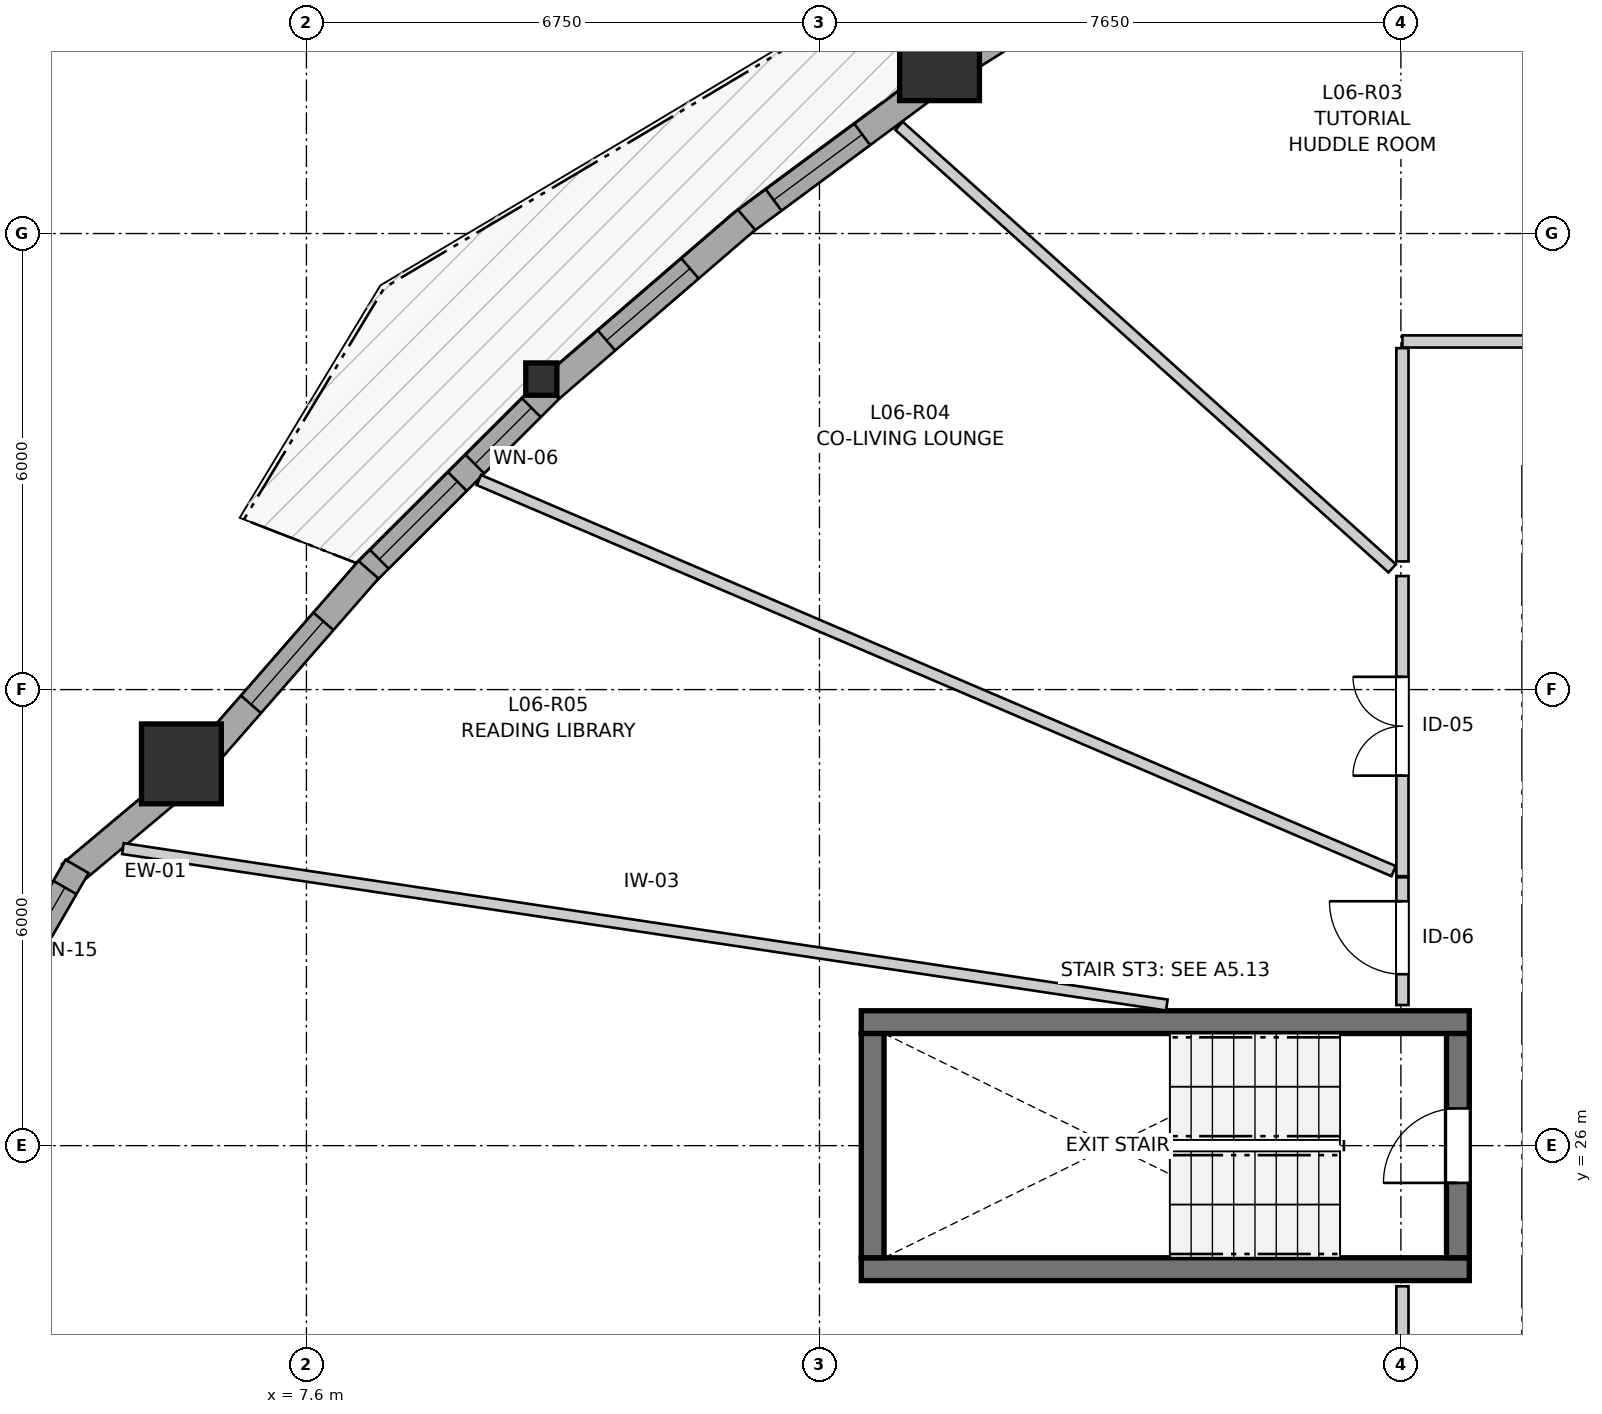
"""IFC4 building model, lengths in metres.
Left out: names, types, materials, properties, quantities, classifications, styles, units other than length and angle.
Written with IfcOpenShell. Run it as: python <this file> out.ifc"""

import sys

from ifc_helpers import new_model, si_unit, direction, frame, frame_2d, origin, origin_2d, place, context, subcontext, project, spatial, rectangle, i_section, extrude, source, transform, mapped, element, fill, save


model = new_model("IFC4")
c1 = context("Model", 3, precision=1e-05, world=origin(), true_north=direction((0.0, 1.0)))
c2 = subcontext(c1, "Body", "Model", "MODEL_VIEW")
j1 = project(units=[si_unit("LENGTHUNIT", "METRE"), si_unit("PLANEANGLEUNIT", "RADIAN")], contexts=[c1])
p1 = place(None, origin())
s1 = spatial("IfcSite", under=j1, at=p1, CompositionType="ELEMENT")
p2 = place(p1, origin())
s2 = spatial("IfcBuilding", under=s1, at=p2, CompositionType="ELEMENT")
p3 = place(p2, frame((0.0, 0.0, 23.8)))
s3 = spatial("IfcBuildingStorey", under=s2, at=p3, CompositionType="ELEMENT", Elevation=23.8)
for number, where, z_axis, x_axis in (
    (1, (14.9, 24.375, 0.0), (0.0, 0.0, 1.0), (1.0, 0.0, 0.0)),
    (2, (22.9, 27.625, 0.0), (0.0, 0.0, 1.0), (-1.0, 0.0, 0.0)),
):
    element("IfcWall", number, at=place(p3, frame(where, z_axis=z_axis, x_axis=x_axis)), inside=s3, PredefinedType="SHEAR", context=c2, shape_type="SweptSolid", body=[
        extrude(rectangle(XDim=8.0, YDim=0.3, at=frame_2d((4.0, 0.0))), origin(), (0.0, 0.0, 1.0), 2.935),
    ])
p4 = place(p3, frame((15.05, 27.475, 0.0), z_axis=(0.0, 0.0, 1.0), x_axis=(0.0, -1.0, 0.0)))
e3 = element("IfcWall", 3, at=p4, inside=s3, PredefinedType="SHEAR", context=c2, shape_type="SweptSolid", body=[
    extrude(rectangle(XDim=2.95, YDim=0.3, at=frame_2d((1.475, 0.0))), origin(), (0.0, 0.0, 1.0), 2.935),
])
p5 = place(p3, frame((22.75, 24.525, 0.0), z_axis=(0.0, 0.0, 1.0), x_axis=(0.0, 1.0, 0.0)))
e4 = element("IfcWall", 4, at=p5, inside=s3, PredefinedType="SHEAR", context=c2, shape_type="SweptSolid", body=[
    extrude(rectangle(XDim=2.95, YDim=0.3, at=frame_2d((1.475, 0.0))), origin(), (0.0, 0.0, 1.0), 2.935),
])
p6 = place(p5, frame((0.985, 0.0, 0.0)))
e5 = element("IfcOpeningElement", 5, at=p6, cuts=e4, PredefinedType="OPENING", context=c2, shape_type="SweptSolid", body=[
    extrude(rectangle(XDim=0.98, YDim=2.15, at=frame_2d((0.49, 1.075))), frame((0.0, 0.16, 0.0), z_axis=(0.0, -1.0, 0.0), x_axis=(1.0, 0.0, 0.0)), (0.0, 0.0, 1.0), 0.32),
])
m1 = source(origin(), c2, "Body", "SweptSolid", [
    extrude(rectangle(XDim=1.05, YDim=1.05, at=origin_2d()), origin(), (0.0, 0.0, 1.0), 2.935),
])
for number, where, z_axis, x_axis in (
    (6, (5.955, 31.023, 0.0), (0.0, 0.0, 1.0), (1.0, 0.0, 0.0)),
    (7, (15.93, 40.274, 0.0), (0.0, 0.0, 1.0), (1.0, 0.0, 0.0)),
):
    element("IfcColumn", number, at=place(p3, frame(where, z_axis=z_axis, x_axis=x_axis)), inside=s3, PredefinedType="COLUMN", context=c2, shape_type="MappedRepresentation", body=[
        mapped(m1, transform((0.0, 0.0, 0.0), x_axis=(1.0, 0.0, 0.0), y_axis=(0.0, 1.0, 0.0), z_axis=(0.0, 0.0, 1.0), scale=1.0)),
    ])
m2 = source(origin(), c2, "Body", "SweptSolid", [
    extrude(i_section(OverallWidth=0.409, OverallDepth=0.425, WebThickness=0.03, FlangeThickness=0.048, FilletRadius=0.015, at=origin_2d()), origin(), (0.0, 0.0, 1.0), 2.935),
])
p7 = place(p3, frame((10.69, 36.085, 0.0), z_axis=(0.0, 0.0, 1.0), x_axis=(1.0, 0.0, 0.0)))
e8 = element("IfcColumn", 8, at=p7, inside=s3, PredefinedType="PILASTER", context=c2, shape_type="MappedRepresentation", body=[
    mapped(m2, transform((0.0, 0.0, 0.0), x_axis=(1.0, 0.0, 0.0), y_axis=(0.0, 1.0, 0.0), z_axis=(0.0, 0.0, 1.0), scale=1.0)),
])
p8 = place(p3, frame((5.838, 30.696, 0.0), z_axis=(0.0, 0.0, 1.0), x_axis=(-0.766001205563, -0.64283913468, 0.0)))
e9 = element("IfcWall", 9, at=p8, inside=s3, PredefinedType="SOLIDWALL", context=c2, shape_type="SweptSolid", body=[
    extrude(rectangle(XDim=1.752, YDim=0.35, at=frame_2d((0.876, 0.0))), origin(), (0.0, 0.0, 1.0), 2.415),
])
p9 = place(p3, frame((4.583, 29.674, 0.0), z_axis=(0.0, 0.0, 1.0), x_axis=(-0.499995423472, -0.866028046028, 0.0)))
e10 = element("IfcWall", 10, at=p9, inside=s3, PredefinedType="SOLIDWALL", context=c2, shape_type="SweptSolid", body=[
    extrude(rectangle(XDim=2.09, YDim=0.35, at=frame_2d((1.045, 0.0))), origin(), (0.0, 0.0, 1.0), 2.415),
])
p10 = place(p9, frame((0.32, 0.0, 0.82)))
e11 = element("IfcOpeningElement", 11, at=p10, cuts=e10, PredefinedType="OPENING", context=c2, shape_type="SweptSolid", body=[
    extrude(rectangle(XDim=1.45, YDim=1.25, at=frame_2d((0.725, 0.625))), frame((0.0, 0.185, 0.0), z_axis=(0.0, -1.0, 0.0), x_axis=(1.0, 0.0, 0.0)), (0.0, 0.0, 1.0), 0.37),
])
p11 = place(p3, frame((3.537, 24.137, 0.0), z_axis=(0.0, 0.0, 1.0), x_axis=(0.499995423472, -0.866028046028, 0.0)))
e12 = element("IfcWall", 12, at=p11, inside=s3, PredefinedType="SOLIDWALL", context=c2, shape_type="SweptSolid", body=[
    extrude(rectangle(XDim=2.09, YDim=0.35, at=frame_2d((1.045, 0.0))), origin(), (0.0, 0.0, 1.0), 2.415),
])
p12 = place(p11, frame((0.32, 0.0, 0.82)))
e13 = element("IfcOpeningElement", 13, at=p12, cuts=e12, PredefinedType="OPENING", context=c2, shape_type="SweptSolid", body=[
    extrude(rectangle(XDim=1.45, YDim=1.25, at=frame_2d((0.725, 0.625))), frame((0.0, 0.185, 0.0), z_axis=(0.0, -1.0, 0.0), x_axis=(1.0, 0.0, 0.0)), (0.0, 0.0, 1.0), 0.37),
])
p13 = place(p3, frame((18.864, 41.913, 0.0), z_axis=(0.0, 0.0, 1.0), x_axis=(-0.84643287852, -0.532495429239, 0.0)))
e14 = element("IfcWall", 14, at=p13, inside=s3, PredefinedType="SOLIDWALL", context=c2, shape_type="SweptSolid", body=[
    extrude(rectangle(XDim=3.056, YDim=0.35, at=frame_2d((1.528, 0.0))), origin(), (0.0, 0.0, 1.0), 2.415),
])
p14 = place(p13, frame((0.808, 0.0, 0.82)))
e15 = element("IfcOpeningElement", 15, at=p14, cuts=e14, PredefinedType="OPENING", context=c2, shape_type="SweptSolid", body=[
    extrude(rectangle(XDim=1.45, YDim=1.25, at=frame_2d((0.725, 0.625))), frame((0.0, 0.185, 0.0), z_axis=(0.0, -1.0, 0.0), x_axis=(1.0, 0.0, 0.0)), (0.0, 0.0, 1.0), 0.37),
])
p15 = place(p3, frame((15.793, 39.955, 0.0), z_axis=(0.0, 0.0, 1.0), x_axis=(-0.803813051054, -0.594881987419, 0.0)))
e16 = element("IfcWall", 16, at=p15, inside=s3, PredefinedType="SOLIDWALL", context=c2, shape_type="SweptSolid", body=[
    extrude(rectangle(XDim=3.075, YDim=0.35, at=frame_2d((1.538, 0.0))), origin(), (0.0, 0.0, 1.0), 2.415),
])
p16 = place(p15, frame((1.095, 0.0, 0.82)))
e17 = element("IfcOpeningElement", 17, at=p16, cuts=e16, PredefinedType="OPENING", context=c2, shape_type="SweptSolid", body=[
    extrude(rectangle(XDim=1.45, YDim=1.25, at=frame_2d((0.725, 0.625))), frame((0.0, 0.185, 0.0), z_axis=(0.0, -1.0, 0.0), x_axis=(1.0, 0.0, 0.0)), (0.0, 0.0, 1.0), 0.37),
])
p17 = place(p3, frame((13.39, 38.181, 0.0), z_axis=(0.0, 0.0, 1.0), x_axis=(-0.757476213352, -0.652862762153, 0.0)))
e18 = element("IfcWall", 18, at=p17, inside=s3, PredefinedType="SOLIDWALL", context=c2, shape_type="SweptSolid", body=[
    extrude(rectangle(XDim=3.393, YDim=0.35, at=frame_2d((1.697, 0.0))), origin(), (0.0, 0.0, 1.0), 2.415),
])
p18 = place(p17, frame((0.982, 0.0, 0.82)))
e19 = element("IfcOpeningElement", 19, at=p18, cuts=e18, PredefinedType="OPENING", context=c2, shape_type="SweptSolid", body=[
    extrude(rectangle(XDim=1.45, YDim=1.25, at=frame_2d((0.725, 0.625))), frame((0.0, 0.185, 0.0), z_axis=(0.0, -1.0, 0.0), x_axis=(1.0, 0.0, 0.0)), (0.0, 0.0, 1.0), 0.37),
])
p19 = place(p3, frame((10.8, 35.947, 0.0), z_axis=(0.0, 0.0, 1.0), x_axis=(-0.708379570295, -0.705831696928, 0.0)))
e20 = element("IfcWall", 20, at=p19, inside=s3, PredefinedType="SOLIDWALL", context=c2, shape_type="SweptSolid", body=[
    extrude(rectangle(XDim=3.449, YDim=0.35, at=frame_2d((1.725, 0.0))), origin(), (0.0, 0.0, 1.0), 2.415),
])
p20 = place(p19, frame((0.339, 0.0, 0.82)))
e21 = element("IfcOpeningElement", 21, at=p20, cuts=e20, PredefinedType="OPENING", context=c2, shape_type="SweptSolid", body=[
    extrude(rectangle(XDim=1.05, YDim=1.45, at=frame_2d((0.525, 0.725))), frame((0.0, 0.185, 0.0), z_axis=(0.0, -1.0, 0.0), x_axis=(1.0, 0.0, 0.0)), (0.0, 0.0, 1.0), 0.37),
])
p21 = place(p19, frame((1.713, 0.0, 0.82)))
e22 = element("IfcOpeningElement", 22, at=p21, cuts=e20, PredefinedType="OPENING", context=c2, shape_type="SweptSolid", body=[
    extrude(rectangle(XDim=1.45, YDim=1.25, at=frame_2d((0.725, 0.625))), frame((0.0, 0.185, 0.0), z_axis=(0.0, -1.0, 0.0), x_axis=(1.0, 0.0, 0.0)), (0.0, 0.0, 1.0), 0.37),
])
p22 = place(p3, frame((8.417, 33.577, 0.0), z_axis=(0.0, 0.0, 1.0), x_axis=(-0.657597964565, -0.75336904436, 0.0)))
e23 = element("IfcWall", 23, at=p22, inside=s3, PredefinedType="SOLIDWALL", context=c2, shape_type="SweptSolid", body=[
    extrude(rectangle(XDim=3.243, YDim=0.35, at=frame_2d((1.621, 0.0))), origin(), (0.0, 0.0, 1.0), 2.415),
])
p23 = place(p22, frame((0.901, 0.0, 0.82)))
e24 = element("IfcOpeningElement", 24, at=p23, cuts=e23, PredefinedType="OPENING", context=c2, shape_type="SweptSolid", body=[
    extrude(rectangle(XDim=1.45, YDim=1.25, at=frame_2d((0.725, 0.625))), frame((0.0, 0.185, 0.0), z_axis=(0.0, -1.0, 0.0), x_axis=(1.0, 0.0, 0.0)), (0.0, 0.0, 1.0), 0.37),
])
p24 = place(p3, frame((22.02, 16.616, 0.0), z_axis=(0.0, 0.0, 1.0), x_axis=(0.0, 1.0, 0.0)))
e25 = element("IfcWall", 25, at=p24, inside=s3, PredefinedType="PARTITIONING", context=c2, shape_type="SweptSolid", body=[
    extrude(rectangle(XDim=7.534, YDim=0.16, at=frame_2d((3.767, 0.0))), origin(), (0.0, 0.0, 1.0), 2.935),
])
p25 = place(p24, frame((2.98, 0.0, 0.0)))
e26 = element("IfcOpeningElement", 26, at=p25, cuts=e25, PredefinedType="OPENING", context=c2, shape_type="SweptSolid", body=[
    extrude(rectangle(XDim=1.3, YDim=2.1, at=frame_2d((0.65, 1.05))), frame((0.0, 0.09, 0.0), z_axis=(0.0, -1.0, 0.0), x_axis=(1.0, 0.0, 0.0)), (0.0, 0.0, 1.0), 0.18),
])
p26 = place(p3, frame((22.02, 36.58, 0.0), z_axis=(0.0, 0.0, 1.0), x_axis=(1.0, 0.0, 0.0)))
e27 = element("IfcWall", 27, at=p26, inside=s3, PredefinedType="PARTITIONING", context=c2, shape_type="SweptSolid", body=[
    extrude(rectangle(XDim=4.874, YDim=0.16, at=frame_2d((2.437, 0.0))), origin(), (0.0, 0.0, 1.0), 2.543),
])
p27 = place(p26, frame((1.779, 0.0, 0.0)))
e28 = element("IfcOpeningElement", 28, at=p27, cuts=e27, PredefinedType="OPENING", context=c2, shape_type="SweptSolid", body=[
    extrude(rectangle(XDim=1.3, YDim=2.1, at=frame_2d((0.65, 1.05))), frame((0.0, 0.09, 0.0), z_axis=(0.0, -1.0, 0.0), x_axis=(1.0, 0.0, 0.0)), (0.0, 0.0, 1.0), 0.18),
])
p28 = place(p3, frame((22.02, 29.545, 0.0), z_axis=(0.0, 0.0, 1.0), x_axis=(0.0, 1.0, 0.0)))
e29 = element("IfcWall", 29, at=p28, inside=s3, PredefinedType="PARTITIONING", context=c2, shape_type="SweptSolid", body=[
    extrude(rectangle(XDim=3.949, YDim=0.16, at=frame_2d((1.975, 0.0))), origin(), (0.0, 0.0, 1.0), 2.935),
])
p29 = place(p28, frame((1.323, 0.0, 0.0)))
e30 = element("IfcOpeningElement", 30, at=p29, cuts=e29, PredefinedType="OPENING", context=c2, shape_type="SweptSolid", body=[
    extrude(rectangle(XDim=1.3, YDim=2.1, at=frame_2d((0.65, 1.05))), frame((0.0, 0.09, 0.0), z_axis=(0.0, -1.0, 0.0), x_axis=(1.0, 0.0, 0.0)), (0.0, 0.0, 1.0), 0.18),
])
p30 = place(p3, frame((22.02, 27.85, 0.0), z_axis=(0.0, 0.0, 1.0), x_axis=(0.0, 1.0, 0.0)))
e31 = element("IfcWall", 31, at=p30, inside=s3, PredefinedType="PARTITIONING", context=c2, shape_type="SweptSolid", body=[
    extrude(rectangle(XDim=1.68, YDim=0.16, at=frame_2d((0.84, 0.0))), origin(), (0.0, 0.0, 1.0), 2.935),
])
p31 = place(p30, frame((0.406, 0.0, 0.0)))
e32 = element("IfcOpeningElement", 32, at=p31, cuts=e31, PredefinedType="OPENING", context=c2, shape_type="SweptSolid", body=[
    extrude(rectangle(XDim=0.96, YDim=2.1, at=frame_2d((0.48, 1.05))), frame((0.0, 0.09, 0.0), z_axis=(0.0, -1.0, 0.0), x_axis=(1.0, 0.0, 0.0)), (0.0, 0.0, 1.0), 0.18),
])
p32 = place(p3, frame((5.185, 29.908, 0.0), z_axis=(0.0, 0.0, 1.0), x_axis=(0.988958777333, -0.148190879394, 0.0)))
e33 = element("IfcWall", 33, at=p32, inside=s3, PredefinedType="PARTITIONING", context=c2, shape_type="SweptSolid", body=[
    extrude(rectangle(XDim=13.888, YDim=0.145, at=frame_2d((6.944, 0.0))), origin(), (0.0, 0.0, 1.0), 2.935),
])
p33 = place(p3, frame((9.869, 34.757, 0.0), z_axis=(0.0, 0.0, 1.0), x_axis=(0.919492001568, -0.393108711493, 0.0)))
e34 = element("IfcWall", 34, at=p33, inside=s3, PredefinedType="PARTITIONING", context=c2, shape_type="SweptSolid", body=[
    extrude(rectangle(XDim=13.089, YDim=0.145, at=frame_2d((6.544, 0.0))), origin(), (0.0, 0.0, 1.0), 2.935),
])
p34 = place(p3, frame((15.398, 39.417, 0.0), z_axis=(0.0, 0.0, 1.0), x_axis=(0.744248709075, -0.667902581998, 0.0)))
e35 = element("IfcWall", 35, at=p34, inside=s3, PredefinedType="PARTITIONING", context=c2, shape_type="SweptSolid", body=[
    extrude(rectangle(XDim=8.717, YDim=0.145, at=frame_2d((4.359, 0.0))), origin(), (0.0, 0.0, 1.0), 2.935),
])
p35 = place(p3, frame((22.02, 33.686, 0.0), z_axis=(0.0, 0.0, 1.0), x_axis=(0.0, 1.0, 0.0)))
e36 = element("IfcWall", 36, at=p35, inside=s3, PredefinedType="PARTITIONING", context=c2, shape_type="SweptSolid", body=[
    extrude(rectangle(XDim=2.806, YDim=0.16, at=frame_2d((1.403, 0.0))), origin(), (0.0, 0.0, 1.0), 2.935),
])
m3 = source(origin(), c2, "Body", "SweptSolid", [
    extrude(rectangle(XDim=1.45, YDim=1.25, at=frame_2d((0.725, 0.625))), frame((0.0, 0.03, 0.0), z_axis=(0.0, -1.0, 0.0), x_axis=(1.0, 0.0, 0.0)), (0.0, 0.0, 1.0), 0.06),
])
p36 = place(p10, origin())
e37 = element("IfcWindow", 37, at=p36, inside=s3, PartitioningType="SINGLE_PANEL", PredefinedType="WINDOW", context=c2, shape_type="MappedRepresentation", body=[
    mapped(m3, transform((0.0, 0.0, 0.0), x_axis=(1.0, 0.0, 0.0), y_axis=(0.0, 1.0, 0.0), z_axis=(0.0, 0.0, 1.0), scale=1.0)),
])
fill(e11, e37)
p37 = place(p12, origin())
e38 = element("IfcWindow", 38, at=p37, inside=s3, PartitioningType="SINGLE_PANEL", PredefinedType="WINDOW", context=c2, shape_type="MappedRepresentation", body=[
    mapped(m3, transform((0.0, 0.0, 0.0), x_axis=(1.0, 0.0, 0.0), y_axis=(0.0, 1.0, 0.0), z_axis=(0.0, 0.0, 1.0), scale=1.0)),
])
fill(e13, e38)
p38 = place(p16, origin())
e39 = element("IfcWindow", 39, at=p38, inside=s3, PartitioningType="SINGLE_PANEL", PredefinedType="WINDOW", context=c2, shape_type="MappedRepresentation", body=[
    mapped(m3, transform((0.0, 0.0, 0.0), x_axis=(1.0, 0.0, 0.0), y_axis=(0.0, 1.0, 0.0), z_axis=(0.0, 0.0, 1.0), scale=1.0)),
])
fill(e17, e39)
p39 = place(p18, origin())
e40 = element("IfcWindow", 40, at=p39, inside=s3, PartitioningType="SINGLE_PANEL", PredefinedType="WINDOW", context=c2, shape_type="MappedRepresentation", body=[
    mapped(m3, transform((0.0, 0.0, 0.0), x_axis=(1.0, 0.0, 0.0), y_axis=(0.0, 1.0, 0.0), z_axis=(0.0, 0.0, 1.0), scale=1.0)),
])
fill(e19, e40)
m4 = source(origin(), c2, "Body", "SweptSolid", [
    extrude(rectangle(XDim=1.05, YDim=1.45, at=frame_2d((0.525, 0.725))), frame((0.0, 0.03, 0.0), z_axis=(0.0, -1.0, 0.0), x_axis=(1.0, 0.0, 0.0)), (0.0, 0.0, 1.0), 0.06),
])
p40 = place(p20, origin())
e41 = element("IfcWindow", 41, at=p40, inside=s3, PartitioningType="SINGLE_PANEL", PredefinedType="WINDOW", context=c2, shape_type="MappedRepresentation", body=[
    mapped(m4, transform((0.0, 0.0, 0.0), x_axis=(1.0, 0.0, 0.0), y_axis=(0.0, 1.0, 0.0), z_axis=(0.0, 0.0, 1.0), scale=1.0)),
])
fill(e21, e41)
p41 = place(p21, origin())
e42 = element("IfcWindow", 42, at=p41, inside=s3, PartitioningType="SINGLE_PANEL", PredefinedType="WINDOW", context=c2, shape_type="MappedRepresentation", body=[
    mapped(m3, transform((0.0, 0.0, 0.0), x_axis=(1.0, 0.0, 0.0), y_axis=(0.0, 1.0, 0.0), z_axis=(0.0, 0.0, 1.0), scale=1.0)),
])
fill(e22, e42)
p42 = place(p23, origin())
e43 = element("IfcWindow", 43, at=p42, inside=s3, PartitioningType="SINGLE_PANEL", PredefinedType="WINDOW", context=c2, shape_type="MappedRepresentation", body=[
    mapped(m3, transform((0.0, 0.0, 0.0), x_axis=(1.0, 0.0, 0.0), y_axis=(0.0, 1.0, 0.0), z_axis=(0.0, 0.0, 1.0), scale=1.0)),
])
fill(e24, e43)
m5 = source(origin(), c2, "Body", "SweptSolid", [
    extrude(rectangle(XDim=0.98, YDim=2.15, at=frame_2d((0.49, 1.075))), frame((0.0, 0.025, 0.0), z_axis=(0.0, -1.0, 0.0), x_axis=(1.0, 0.0, 0.0)), (0.0, 0.0, 1.0), 0.05),
])
p43 = place(p6, origin())
e44 = element("IfcDoor", 44, at=p43, inside=s3, OperationType="SINGLE_SWING_LEFT", PredefinedType="DOOR", context=c2, shape_type="MappedRepresentation", body=[
    mapped(m5, transform((0.0, 0.0, 0.0), x_axis=(1.0, 0.0, 0.0), y_axis=(0.0, 1.0, 0.0), z_axis=(0.0, 0.0, 1.0), scale=1.0)),
])
fill(e5, e44)
m6 = source(origin(), c2, "Body", "SweptSolid", [
    extrude(rectangle(XDim=1.3, YDim=2.1, at=frame_2d((0.65, 1.05))), frame((0.0, 0.025, 0.0), z_axis=(0.0, -1.0, 0.0), x_axis=(1.0, 0.0, 0.0)), (0.0, 0.0, 1.0), 0.05),
])
p44 = place(p29, origin())
e45 = element("IfcDoor", 45, at=p44, inside=s3, OperationType="DOUBLE_DOOR_SINGLE_SWING", PredefinedType="DOOR", context=c2, shape_type="MappedRepresentation", body=[
    mapped(m6, transform((0.0, 0.0, 0.0), x_axis=(1.0, 0.0, 0.0), y_axis=(0.0, 1.0, 0.0), z_axis=(0.0, 0.0, 1.0), scale=1.0)),
])
fill(e30, e45)
m7 = source(origin(), c2, "Body", "SweptSolid", [
    extrude(rectangle(XDim=0.96, YDim=2.1, at=frame_2d((0.48, 1.05))), frame((0.0, 0.025, 0.0), z_axis=(0.0, -1.0, 0.0), x_axis=(1.0, 0.0, 0.0)), (0.0, 0.0, 1.0), 0.05),
])
p45 = place(p31, origin())
e46 = element("IfcDoor", 46, at=p45, inside=s3, OperationType="SINGLE_SWING_RIGHT", PredefinedType="DOOR", context=c2, shape_type="MappedRepresentation", body=[
    mapped(m7, transform((0.0, 0.0, 0.0), x_axis=(1.0, 0.0, 0.0), y_axis=(0.0, 1.0, 0.0), z_axis=(0.0, 0.0, 1.0), scale=1.0)),
])
fill(e32, e46)
save(model, sys.argv[1])
